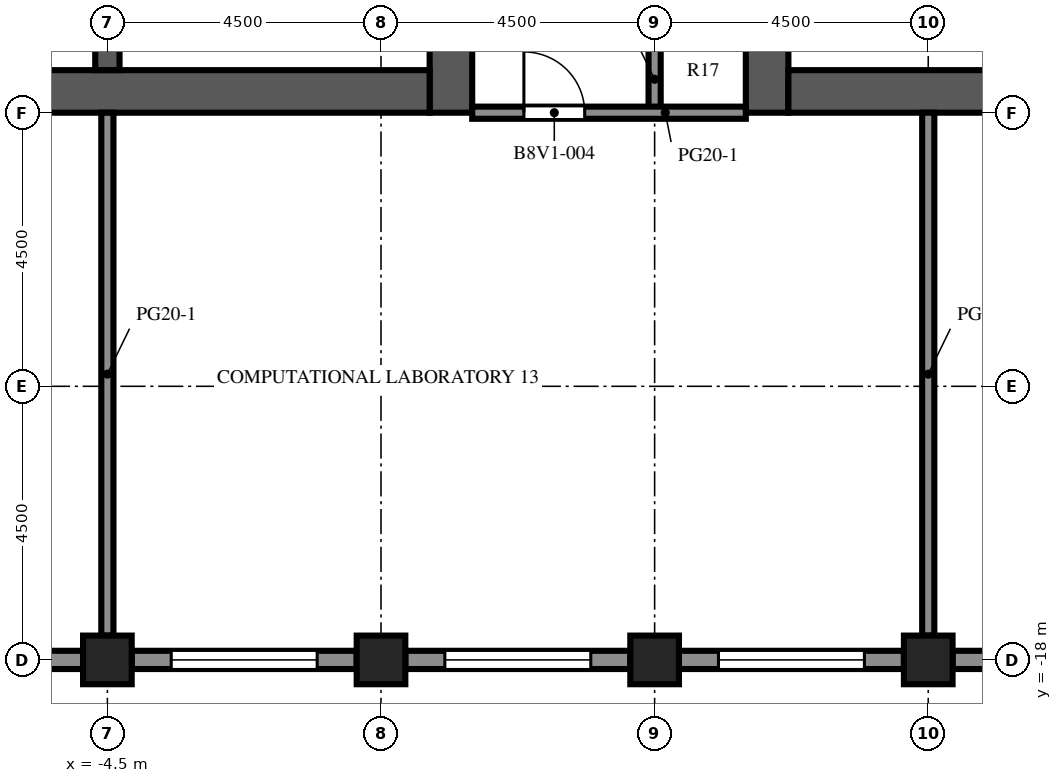
"""IFC4 building model, lengths in metres.
Left out: names, types, materials, properties, quantities, classifications, styles, units other than length and angle.
Written with IfcOpenShell. Run it as: python <this file> out.ifc"""

import sys

from ifc_helpers import new_model, si_unit, direction, frame, frame_2d, origin, origin_2d, place, context, subcontext, project, spatial, rectangle, extrude, element, fill, save


model = new_model("IFC4")
c1 = context("Model", 3, precision=1e-05, world=origin(), true_north=direction((0.0, 1.0)))
c2 = subcontext(c1, "Body", "Model", "MODEL_VIEW")
j1 = project(units=[si_unit("LENGTHUNIT", "METRE"), si_unit("PLANEANGLEUNIT", "RADIAN")], contexts=[c1])
p1 = place(None, origin())
s1 = spatial("IfcSite", under=j1, at=p1, CompositionType="ELEMENT")
p2 = place(p1, origin())
s2 = spatial("IfcBuilding", under=s1, at=p2, CompositionType="ELEMENT")
p3 = place(p2, frame((0.0, 0.0, 270.4)))
s3 = spatial("IfcBuildingStorey", under=s2, at=p3, CompositionType="ELEMENT", Elevation=270.4)
for number, where, z_axis, x_axis in (
    (1, (-4.5, -18.0, 0.0), (0.0, 0.0, 1.0), (1.0, 0.0, 0.0)),
    (2, (0.0, -18.0, 0.0), (0.0, 0.0, 1.0), (1.0, 0.0, 0.0)),
    (3, (4.5, -18.0, 0.0), (0.0, 0.0, 1.0), (1.0, 0.0, 0.0)),
    (4, (9.0, -18.0, 0.0), (0.0, 0.0, 1.0), (1.0, 0.0, 0.0)),
):
    element("IfcColumn", number, at=place(p3, frame(where, z_axis=z_axis, x_axis=x_axis)), inside=s3, PredefinedType="COLUMN", context=c2, shape_type="SweptSolid", body=[
        extrude(rectangle(XDim=0.8, YDim=0.8, at=origin_2d()), origin(), (0.0, 0.0, 1.0), 4.1),
    ])
p4 = place(p3, frame((1.15, -9.0, 0.0), z_axis=(0.0, 0.0, 1.0), x_axis=(0.0, 1.0, 0.0)))
e5 = element("IfcWall", 5, at=p4, inside=s3, PredefinedType="SHEAR", context=c2, shape_type="SweptSolid", body=[
    extrude(rectangle(XDim=27.5, YDim=0.7, at=frame_2d((13.75, 0.0))), origin(), (0.0, 0.0, 1.0), 4.1),
])
p5 = place(p4, frame((12.55, 0.0, 0.0)))
e6 = element("IfcOpeningElement", 6, at=p5, cuts=e5, PredefinedType="OPENING", context=c2, shape_type="SweptSolid", body=[
    extrude(rectangle(XDim=2.4, YDim=2.4, at=frame_2d((1.2, 1.2))), frame((0.0, 0.36, 0.0), z_axis=(0.0, -1.0, 0.0), x_axis=(1.0, 0.0, 0.0)), (0.0, 0.0, 1.0), 0.72),
])
p6 = place(p4, frame((3.9, 0.0, 0.0)))
e7 = element("IfcOpeningElement", 7, at=p6, cuts=e5, PredefinedType="OPENING", context=c2, shape_type="SweptSolid", body=[
    extrude(rectangle(XDim=1.2, YDim=2.1, at=frame_2d((0.6, 1.05))), frame((0.0, 0.36, 0.0), z_axis=(0.0, -1.0, 0.0), x_axis=(1.0, 0.0, 0.0)), (0.0, 0.0, 1.0), 0.72),
])
p7 = place(p4, frame((19.46, 0.0, 0.0)))
e8 = element("IfcOpeningElement", 8, at=p7, cuts=e5, PredefinedType="OPENING", context=c2, shape_type="SweptSolid", body=[
    extrude(rectangle(XDim=1.0, YDim=2.1, at=frame_2d((0.5, 1.05))), frame((0.0, 0.36, 0.0), z_axis=(0.0, -1.0, 0.0), x_axis=(1.0, 0.0, 0.0)), (0.0, 0.0, 1.0), 0.72),
])
p8 = place(p4, frame((21.17, 0.0, 0.0)))
e9 = element("IfcOpeningElement", 9, at=p8, cuts=e5, PredefinedType="OPENING", context=c2, shape_type="SweptSolid", body=[
    extrude(rectangle(XDim=1.0, YDim=2.1, at=frame_2d((0.5, 1.05))), frame((0.0, 0.36, 0.0), z_axis=(0.0, -1.0, 0.0), x_axis=(1.0, 0.0, 0.0)), (0.0, 0.0, 1.0), 0.72),
])
p9 = place(p4, frame((23.26, 0.0, 0.0)))
e10 = element("IfcOpeningElement", 10, at=p9, cuts=e5, PredefinedType="OPENING", context=c2, shape_type="SweptSolid", body=[
    extrude(rectangle(XDim=1.0, YDim=2.1, at=frame_2d((0.5, 1.05))), frame((0.0, 0.36, 0.0), z_axis=(0.0, -1.0, 0.0), x_axis=(1.0, 0.0, 0.0)), (0.0, 0.0, 1.0), 0.72),
])
p10 = place(p4, frame((25.35, 0.0, 0.0)))
e11 = element("IfcOpeningElement", 11, at=p10, cuts=e5, PredefinedType="OPENING", context=c2, shape_type="SweptSolid", body=[
    extrude(rectangle(XDim=1.0, YDim=2.1, at=frame_2d((0.5, 1.05))), frame((0.0, 0.36, 0.0), z_axis=(0.0, -1.0, 0.0), x_axis=(1.0, 0.0, 0.0)), (0.0, 0.0, 1.0), 0.72),
])
p11 = place(p3, frame((-9.8, -8.65, 0.0), z_axis=(0.0, 0.0, 1.0), x_axis=(1.0, 0.0, 0.0)))
e12 = element("IfcWall", 12, at=p11, inside=s3, PredefinedType="SHEAR", context=c2, shape_type="SweptSolid", body=[
    extrude(rectangle(XDim=10.6, YDim=0.7, at=frame_2d((5.3, 0.0))), origin(), (0.0, 0.0, 1.0), 4.1),
])
p12 = place(p3, frame((-4.5, -8.3, 0.0), z_axis=(0.0, 0.0, 1.0), x_axis=(0.0, 1.0, 0.0)))
e13 = element("IfcWall", 13, at=p12, inside=s3, PredefinedType="SHEAR", context=c2, shape_type="SweptSolid", body=[
    extrude(rectangle(XDim=7.6, YDim=0.4, at=frame_2d((3.8, 0.0))), origin(), (0.0, 0.0, 1.0), 4.1),
])
p13 = place(p3, frame((6.35, -9.0, 0.0), z_axis=(0.0, 0.0, 1.0), x_axis=(0.0, 1.0, 0.0)))
e14 = element("IfcWall", 14, at=p13, inside=s3, PredefinedType="SHEAR", context=c2, shape_type="SweptSolid", body=[
    extrude(rectangle(XDim=27.5, YDim=0.7, at=frame_2d((13.75, 0.0))), origin(), (0.0, 0.0, 1.0), 4.1),
])
p14 = place(p13, frame((12.55, 0.0, 0.0)))
e15 = element("IfcOpeningElement", 15, at=p14, cuts=e14, PredefinedType="OPENING", context=c2, shape_type="SweptSolid", body=[
    extrude(rectangle(XDim=2.4, YDim=2.4, at=frame_2d((1.2, 1.2))), frame((0.0, 0.36, 0.0), z_axis=(0.0, -1.0, 0.0), x_axis=(1.0, 0.0, 0.0)), (0.0, 0.0, 1.0), 0.72),
])
p15 = place(p13, frame((3.9, 0.0, 0.0)))
e16 = element("IfcOpeningElement", 16, at=p15, cuts=e14, PredefinedType="OPENING", context=c2, shape_type="SweptSolid", body=[
    extrude(rectangle(XDim=1.2, YDim=2.1, at=frame_2d((0.6, 1.05))), frame((0.0, 0.36, 0.0), z_axis=(0.0, -1.0, 0.0), x_axis=(1.0, 0.0, 0.0)), (0.0, 0.0, 1.0), 0.72),
])
p16 = place(p13, frame((19.46, 0.0, 0.0)))
e17 = element("IfcOpeningElement", 17, at=p16, cuts=e14, PredefinedType="OPENING", context=c2, shape_type="SweptSolid", body=[
    extrude(rectangle(XDim=1.0, YDim=2.1, at=frame_2d((0.5, 1.05))), frame((0.0, 0.36, 0.0), z_axis=(0.0, -1.0, 0.0), x_axis=(1.0, 0.0, 0.0)), (0.0, 0.0, 1.0), 0.72),
])
p17 = place(p13, frame((21.17, 0.0, 0.0)))
e18 = element("IfcOpeningElement", 18, at=p17, cuts=e14, PredefinedType="OPENING", context=c2, shape_type="SweptSolid", body=[
    extrude(rectangle(XDim=1.0, YDim=2.1, at=frame_2d((0.5, 1.05))), frame((0.0, 0.36, 0.0), z_axis=(0.0, -1.0, 0.0), x_axis=(1.0, 0.0, 0.0)), (0.0, 0.0, 1.0), 0.72),
])
p18 = place(p13, frame((23.26, 0.0, 0.0)))
e19 = element("IfcOpeningElement", 19, at=p18, cuts=e14, PredefinedType="OPENING", context=c2, shape_type="SweptSolid", body=[
    extrude(rectangle(XDim=1.0, YDim=2.1, at=frame_2d((0.5, 1.05))), frame((0.0, 0.36, 0.0), z_axis=(0.0, -1.0, 0.0), x_axis=(1.0, 0.0, 0.0)), (0.0, 0.0, 1.0), 0.72),
])
p19 = place(p13, frame((25.35, 0.0, 0.0)))
e20 = element("IfcOpeningElement", 20, at=p19, cuts=e14, PredefinedType="OPENING", context=c2, shape_type="SweptSolid", body=[
    extrude(rectangle(XDim=1.0, YDim=2.1, at=frame_2d((0.5, 1.05))), frame((0.0, 0.36, 0.0), z_axis=(0.0, -1.0, 0.0), x_axis=(1.0, 0.0, 0.0)), (0.0, 0.0, 1.0), 0.72),
])
p20 = place(p3, frame((6.7, -8.65, 0.0), z_axis=(0.0, 0.0, 1.0), x_axis=(1.0, 0.0, 0.0)))
e21 = element("IfcWall", 21, at=p20, inside=s3, PredefinedType="SHEAR", context=c2, shape_type="SweptSolid", body=[
    extrude(rectangle(XDim=10.6, YDim=0.7, at=frame_2d((5.3, 0.0))), origin(), (0.0, 0.0, 1.0), 4.1),
])
p21 = place(p3, frame((-4.9, -18.0, 0.0), z_axis=(0.0, 0.0, 1.0), x_axis=(-1.0, 0.0, 0.0)))
e22 = element("IfcWall", 22, at=p21, inside=s3, PredefinedType="SOLIDWALL", context=c2, shape_type="SweptSolid", body=[
    extrude(rectangle(XDim=3.7, YDim=0.3, at=frame_2d((1.85, 0.0))), origin(), (0.0, 0.0, 1.0), 2.85),
])
p22 = place(p21, frame((0.65, 0.0, 0.8)))
e23 = element("IfcOpeningElement", 23, at=p22, cuts=e22, PredefinedType="OPENING", context=c2, shape_type="SweptSolid", body=[
    extrude(rectangle(XDim=2.4, YDim=1.7, at=frame_2d((1.2, 0.85))), frame((0.0, 0.16, 0.0), z_axis=(0.0, -1.0, 0.0), x_axis=(1.0, 0.0, 0.0)), (0.0, 0.0, 1.0), 0.32),
])
p23 = place(p3, frame((-0.4, -18.0, 0.0), z_axis=(0.0, 0.0, 1.0), x_axis=(-1.0, 0.0, 0.0)))
e24 = element("IfcWall", 24, at=p23, inside=s3, PredefinedType="SOLIDWALL", context=c2, shape_type="SweptSolid", body=[
    extrude(rectangle(XDim=3.7, YDim=0.3, at=frame_2d((1.85, 0.0))), origin(), (0.0, 0.0, 1.0), 2.85),
])
p24 = place(p23, frame((0.65, 0.0, 0.8)))
e25 = element("IfcOpeningElement", 25, at=p24, cuts=e24, PredefinedType="OPENING", context=c2, shape_type="SweptSolid", body=[
    extrude(rectangle(XDim=2.4, YDim=1.7, at=frame_2d((1.2, 0.85))), frame((0.0, 0.16, 0.0), z_axis=(0.0, -1.0, 0.0), x_axis=(1.0, 0.0, 0.0)), (0.0, 0.0, 1.0), 0.32),
])
p25 = place(p3, frame((4.1, -18.0, 0.0), z_axis=(0.0, 0.0, 1.0), x_axis=(-1.0, 0.0, 0.0)))
e26 = element("IfcWall", 26, at=p25, inside=s3, PredefinedType="SOLIDWALL", context=c2, shape_type="SweptSolid", body=[
    extrude(rectangle(XDim=3.7, YDim=0.3, at=frame_2d((1.85, 0.0))), origin(), (0.0, 0.0, 1.0), 2.85),
])
p26 = place(p25, frame((0.65, 0.0, 0.8)))
e27 = element("IfcOpeningElement", 27, at=p26, cuts=e26, PredefinedType="OPENING", context=c2, shape_type="SweptSolid", body=[
    extrude(rectangle(XDim=2.4, YDim=1.7, at=frame_2d((1.2, 0.85))), frame((0.0, 0.16, 0.0), z_axis=(0.0, -1.0, 0.0), x_axis=(1.0, 0.0, 0.0)), (0.0, 0.0, 1.0), 0.32),
])
p27 = place(p3, frame((8.6, -18.0, 0.0), z_axis=(0.0, 0.0, 1.0), x_axis=(-1.0, 0.0, 0.0)))
e28 = element("IfcWall", 28, at=p27, inside=s3, PredefinedType="SOLIDWALL", context=c2, shape_type="SweptSolid", body=[
    extrude(rectangle(XDim=3.7, YDim=0.3, at=frame_2d((1.85, 0.0))), origin(), (0.0, 0.0, 1.0), 2.85),
])
p28 = place(p27, frame((0.65, 0.0, 0.8)))
e29 = element("IfcOpeningElement", 29, at=p28, cuts=e28, PredefinedType="OPENING", context=c2, shape_type="SweptSolid", body=[
    extrude(rectangle(XDim=2.4, YDim=1.7, at=frame_2d((1.2, 0.85))), frame((0.0, 0.16, 0.0), z_axis=(0.0, -1.0, 0.0), x_axis=(1.0, 0.0, 0.0)), (0.0, 0.0, 1.0), 0.32),
])
p29 = place(p3, frame((13.1, -18.0, 0.0), z_axis=(0.0, 0.0, 1.0), x_axis=(-1.0, 0.0, 0.0)))
e30 = element("IfcWall", 30, at=p29, inside=s3, PredefinedType="SOLIDWALL", context=c2, shape_type="SweptSolid", body=[
    extrude(rectangle(XDim=3.7, YDim=0.3, at=frame_2d((1.85, 0.0))), origin(), (0.0, 0.0, 1.0), 2.85),
])
p30 = place(p29, frame((1.35, 0.0, 0.0)))
e31 = element("IfcOpeningElement", 31, at=p30, cuts=e30, PredefinedType="OPENING", context=c2, shape_type="SweptSolid", body=[
    extrude(rectangle(XDim=1.0, YDim=2.2, at=frame_2d((0.5, 1.1))), frame((0.0, 0.16, 0.0), z_axis=(0.0, -1.0, 0.0), x_axis=(1.0, 0.0, 0.0)), (0.0, 0.0, 1.0), 0.32),
])
p31 = place(p3, frame((-4.5, -17.6, 0.0), z_axis=(0.0, 0.0, 1.0), x_axis=(0.0, 1.0, 0.0)))
e32 = element("IfcWall", 32, at=p31, inside=s3, PredefinedType="PARTITIONING", context=c2, shape_type="SweptSolid", body=[
    extrude(rectangle(XDim=8.6, YDim=0.2, at=frame_2d((4.3, 0.0))), origin(), (0.0, 0.0, 1.0), 3.65),
])
p32 = place(p3, frame((4.5, -6.0, 0.0), z_axis=(0.0, 0.0, 1.0), x_axis=(0.0, -1.0, 0.0)))
e33 = element("IfcWall", 33, at=p32, inside=s3, PredefinedType="PARTITIONING", context=c2, shape_type="SweptSolid", body=[
    extrude(rectangle(XDim=3.0, YDim=0.2, at=frame_2d((1.5, 0.0))), origin(), (0.0, 0.0, 1.0), 3.65),
])
p33 = place(p32, frame((0.9, 0.0, 0.0)))
e34 = element("IfcOpeningElement", 34, at=p33, cuts=e33, PredefinedType="OPENING", context=c2, shape_type="SweptSolid", body=[
    extrude(rectangle(XDim=1.0, YDim=2.1, at=frame_2d((0.5, 1.05))), frame((0.0, 0.11, 0.0), z_axis=(0.0, -1.0, 0.0), x_axis=(1.0, 0.0, 0.0)), (0.0, 0.0, 1.0), 0.22),
])
p34 = place(p3, frame((9.0, -17.6, 0.0), z_axis=(0.0, 0.0, 1.0), x_axis=(0.0, 1.0, 0.0)))
e35 = element("IfcWall", 35, at=p34, inside=s3, PredefinedType="PARTITIONING", context=c2, shape_type="SweptSolid", body=[
    extrude(rectangle(XDim=8.6, YDim=0.2, at=frame_2d((4.3, 0.0))), origin(), (0.0, 0.0, 1.0), 3.65),
])
p35 = place(p3, frame((6.0, -9.0, 0.0), z_axis=(0.0, 0.0, 1.0), x_axis=(-1.0, 0.0, 0.0)))
e36 = element("IfcWall", 36, at=p35, inside=s3, PredefinedType="PARTITIONING", context=c2, shape_type="SweptSolid", body=[
    extrude(rectangle(XDim=4.5, YDim=0.2, at=frame_2d((2.25, 0.0))), origin(), (0.0, 0.0, 1.0), 3.65),
])
p36 = place(p35, frame((2.65, 0.0, 0.0)))
e37 = element("IfcOpeningElement", 37, at=p36, cuts=e36, PredefinedType="OPENING", context=c2, shape_type="SweptSolid", body=[
    extrude(rectangle(XDim=1.0, YDim=2.1, at=frame_2d((0.5, 1.05))), frame((0.0, 0.11, 0.0), z_axis=(0.0, -1.0, 0.0), x_axis=(1.0, 0.0, 0.0)), (0.0, 0.0, 1.0), 0.22),
])
p37 = place(p24, origin())
e38 = element("IfcWindow", 38, at=p37, inside=s3, PartitioningType="SINGLE_PANEL", PredefinedType="WINDOW", context=c2, shape_type="SweptSolid", body=[
    extrude(rectangle(XDim=2.4, YDim=1.7, at=frame_2d((1.2, 0.85))), frame((0.0, 0.03, 0.0), z_axis=(0.0, -1.0, 0.0), x_axis=(1.0, 0.0, 0.0)), (0.0, 0.0, 1.0), 0.06),
])
fill(e25, e38)
p38 = place(p26, origin())
e39 = element("IfcWindow", 39, at=p38, inside=s3, PartitioningType="SINGLE_PANEL", PredefinedType="WINDOW", context=c2, shape_type="SweptSolid", body=[
    extrude(rectangle(XDim=2.4, YDim=1.7, at=frame_2d((1.2, 0.85))), frame((0.0, 0.03, 0.0), z_axis=(0.0, -1.0, 0.0), x_axis=(1.0, 0.0, 0.0)), (0.0, 0.0, 1.0), 0.06),
])
fill(e27, e39)
p39 = place(p28, origin())
e40 = element("IfcWindow", 40, at=p39, inside=s3, PartitioningType="SINGLE_PANEL", PredefinedType="WINDOW", context=c2, shape_type="SweptSolid", body=[
    extrude(rectangle(XDim=2.4, YDim=1.7, at=frame_2d((1.2, 0.85))), frame((0.0, 0.03, 0.0), z_axis=(0.0, -1.0, 0.0), x_axis=(1.0, 0.0, 0.0)), (0.0, 0.0, 1.0), 0.06),
])
fill(e29, e40)
p40 = place(p36, origin())
e41 = element("IfcDoor", 41, at=p40, inside=s3, OperationType="SINGLE_SWING_RIGHT", PredefinedType="DOOR", context=c2, shape_type="SweptSolid", body=[
    extrude(rectangle(XDim=1.0, YDim=2.1, at=frame_2d((0.5, 1.05))), frame((0.0, 0.025, 0.0), z_axis=(0.0, -1.0, 0.0), x_axis=(1.0, 0.0, 0.0)), (0.0, 0.0, 1.0), 0.05),
])
fill(e37, e41)
save(model, sys.argv[1])
